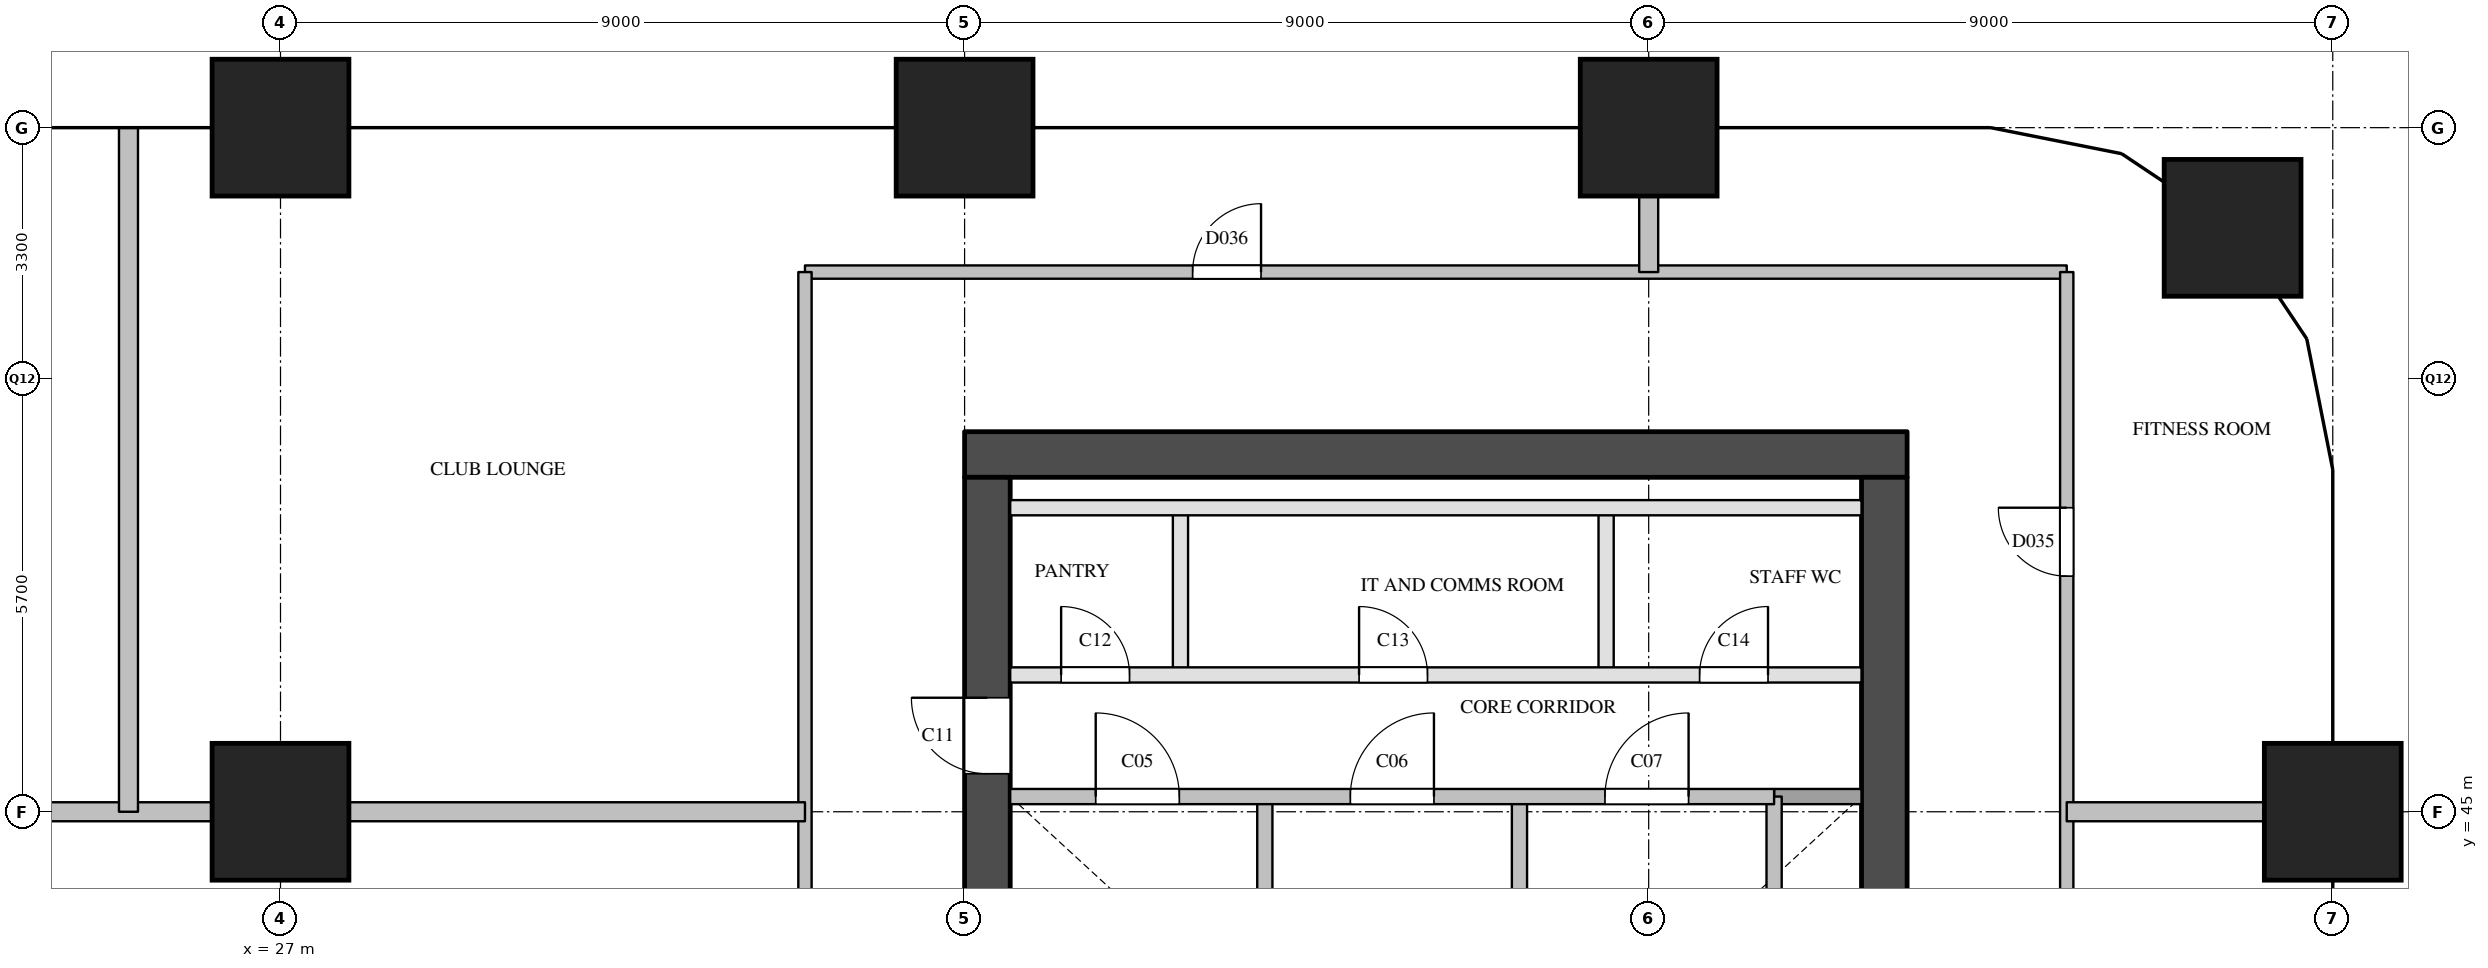
"""IFC4 building model, lengths in metres.
Left out: names, types, materials, properties, quantities, classifications, styles, units other than length and angle.
Written with IfcOpenShell. Run it as: python <this file> out.ifc"""

import sys

from ifc_helpers import new_model, si_unit, direction, frame, frame_2d, origin, origin_2d, place, context, subcontext, project, spatial, rectangle, extrude, element, fill, save


model = new_model("IFC4")
c1 = context("Model", 3, precision=1e-05, world=origin(), true_north=direction((0.0, 1.0)))
c2 = subcontext(c1, "Body", "Model", "MODEL_VIEW")
j1 = project(units=[si_unit("LENGTHUNIT", "METRE"), si_unit("PLANEANGLEUNIT", "RADIAN")], contexts=[c1])
p1 = place(None, origin())
s1 = spatial("IfcSite", under=j1, at=p1, CompositionType="ELEMENT")
p2 = place(p1, origin())
s2 = spatial("IfcBuilding", under=s1, at=p2, CompositionType="ELEMENT")
p3 = place(p2, frame((0.0, 0.0, 85.4)))
s3 = spatial("IfcBuildingStorey", under=s2, at=p3, CompositionType="ELEMENT", Elevation=85.4)
for number, where, z_axis, x_axis in (
    (1, (27.0, 45.0, 0.0), (0.0, 0.0, 1.0), (1.0, 0.0, 0.0)),
    (2, (27.0, 54.0, 0.0), (0.0, 0.0, 1.0), (1.0, 0.0, 0.0)),
    (3, (36.0, 54.0, 0.0), (0.0, 0.0, 1.0), (1.0, 0.0, 0.0)),
    (4, (45.0, 54.0, 0.0), (0.0, 0.0, 1.0), (1.0, 0.0, 0.0)),
    (5, (54.0, 45.0, 0.0), (0.0, 0.0, 1.0), (1.0, 0.0, 0.0)),
    (6, (52.682, 52.682, 0.0), (0.0, 0.0, 1.0), (1.0, 0.0, 0.0)),
):
    element("IfcColumn", number, at=place(p3, frame(where, z_axis=z_axis, x_axis=x_axis)), inside=s3, PredefinedType="COLUMN", context=c2, shape_type="SweptSolid", body=[
        extrude(rectangle(XDim=1.8, YDim=1.8, at=origin_2d()), origin(), (0.0, 0.0, 1.0), 3.8),
    ])
p4 = place(p3, frame((36.0, 49.7, 0.0), z_axis=(0.0, 0.0, 1.0), x_axis=(1.0, 0.0, 0.0)))
e7 = element("IfcWall", 7, at=p4, inside=s3, PredefinedType="SHEAR", context=c2, shape_type="SweptSolid", body=[
    extrude(rectangle(XDim=12.4, YDim=0.6, at=frame_2d((6.2, 0.0))), origin(), (0.0, 0.0, 1.0), 3.5),
])
p5 = place(p3, frame((36.3, 29.1, 0.0), z_axis=(0.0, 0.0, 1.0), x_axis=(0.0, 1.0, 0.0)))
e8 = element("IfcWall", 8, at=p5, inside=s3, PredefinedType="SHEAR", context=c2, shape_type="SweptSolid", body=[
    extrude(rectangle(XDim=20.3, YDim=0.6, at=frame_2d((10.15, 0.0))), origin(), (0.0, 0.0, 1.0), 3.5),
])
p6 = place(p5, frame((3.6, 0.0, 0.0)))
e9 = element("IfcOpeningElement", 9, at=p6, cuts=e8, PredefinedType="OPENING", context=c2, shape_type="SweptSolid", body=[
    extrude(rectangle(XDim=1.8, YDim=2.1, at=frame_2d((0.9, 1.05))), frame((0.0, 0.31, 0.0), z_axis=(0.0, -1.0, 0.0), x_axis=(1.0, 0.0, 0.0)), (0.0, 0.0, 1.0), 0.62),
])
p7 = place(p5, frame((16.4, 0.0, 0.0)))
e10 = element("IfcOpeningElement", 10, at=p7, cuts=e8, PredefinedType="OPENING", context=c2, shape_type="SweptSolid", body=[
    extrude(rectangle(XDim=1.0, YDim=2.1, at=frame_2d((0.5, 1.05))), frame((0.0, 0.31, 0.0), z_axis=(0.0, -1.0, 0.0), x_axis=(1.0, 0.0, 0.0)), (0.0, 0.0, 1.0), 0.62),
])
p8 = place(p3, frame((48.1, 29.1, 0.0), z_axis=(0.0, 0.0, 1.0), x_axis=(0.0, 1.0, 0.0)))
e11 = element("IfcWall", 11, at=p8, inside=s3, PredefinedType="SHEAR", context=c2, shape_type="SweptSolid", body=[
    extrude(rectangle(XDim=20.3, YDim=0.6, at=frame_2d((10.15, 0.0))), origin(), (0.0, 0.0, 1.0), 3.5),
])
p9 = place(p8, frame((12.5, 0.0, 0.0)))
e12 = element("IfcOpeningElement", 12, at=p9, cuts=e11, PredefinedType="OPENING", context=c2, shape_type="SweptSolid", body=[
    extrude(rectangle(XDim=0.7, YDim=2.1, at=frame_2d((0.35, 1.05))), frame((0.0, 0.31, 0.0), z_axis=(0.0, -1.0, 0.0), x_axis=(1.0, 0.0, 0.0)), (0.0, 0.0, 1.0), 0.62),
])
p10 = place(p8, frame((3.9, 0.0, 0.0)))
e13 = element("IfcOpeningElement", 13, at=p10, cuts=e11, PredefinedType="OPENING", context=c2, shape_type="SweptSolid", body=[
    extrude(rectangle(XDim=1.8, YDim=2.1, at=frame_2d((0.9, 1.05))), frame((0.0, 0.31, 0.0), z_axis=(0.0, -1.0, 0.0), x_axis=(1.0, 0.0, 0.0)), (0.0, 0.0, 1.0), 0.62),
])
p11 = place(p3, frame((38.84, 46.8, 0.0), z_axis=(0.0, 0.0, 1.0), x_axis=(0.0, 1.0, 0.0)))
e14 = element("IfcWall", 14, at=p11, inside=s3, PredefinedType="PARTITIONING", context=c2, shape_type="SweptSolid", body=[
    extrude(rectangle(XDim=2.2, YDim=0.2, at=frame_2d((1.1, 0.0))), origin(), (0.0, 0.0, 1.0), 3.5),
])
for number, where, z_axis, x_axis in (
    (15, (39.95, 40.78, 0.0), (0.0, 0.0, 1.0), (0.0, 1.0, 0.0)),
    (16, (43.3, 40.78, 0.0), (0.0, 0.0, 1.0), (0.0, 1.0, 0.0)),
):
    element("IfcWall", number, at=place(p3, frame(where, z_axis=z_axis, x_axis=x_axis)), inside=s3, PredefinedType="SOLIDWALL", context=c2, shape_type="SweptSolid", body=[
        extrude(rectangle(XDim=4.42, YDim=0.2, at=frame_2d((2.21, 0.0))), origin(), (0.0, 0.0, 1.0), 3.5),
    ])
p12 = place(p3, frame((44.44, 46.8, 0.0), z_axis=(0.0, 0.0, 1.0), x_axis=(0.0, 1.0, 0.0)))
e17 = element("IfcWall", 17, at=p12, inside=s3, PredefinedType="PARTITIONING", context=c2, shape_type="SweptSolid", body=[
    extrude(rectangle(XDim=2.2, YDim=0.2, at=frame_2d((1.1, 0.0))), origin(), (0.0, 0.0, 1.0), 3.5),
])
p13 = place(p3, frame((46.65, 40.78, 0.0), z_axis=(0.0, 0.0, 1.0), x_axis=(0.0, 1.0, 0.0)))
e18 = element("IfcWall", 18, at=p13, inside=s3, PredefinedType="SOLIDWALL", context=c2, shape_type="SweptSolid", body=[
    extrude(rectangle(XDim=4.42, YDim=0.2, at=frame_2d((2.21, 0.0))), origin(), (0.0, 0.0, 1.0), 3.5),
])
p14 = place(p3, frame((46.65, 45.2, 0.0), z_axis=(0.0, 0.0, 1.0), x_axis=(1.0, 0.0, 0.0)))
e19 = element("IfcWall", 19, at=p14, inside=s3, PredefinedType="SOLIDWALL", context=c2, shape_type="SweptSolid", body=[
    extrude(rectangle(XDim=1.15, YDim=0.2, at=frame_2d((0.575, 0.0))), origin(), (0.0, 0.0, 1.0), 3.5),
])
p15 = place(p3, frame((36.6, 45.2, 0.0), z_axis=(0.0, 0.0, 1.0), x_axis=(1.0, 0.0, 0.0)))
e20 = element("IfcWall", 20, at=p15, inside=s3, PredefinedType="SOLIDWALL", context=c2, shape_type="SweptSolid", body=[
    extrude(rectangle(XDim=10.05, YDim=0.2, at=frame_2d((5.025, 0.0))), origin(), (0.0, 0.0, 1.0), 3.5),
])
p16 = place(p15, frame((1.125, 0.0, 0.0)))
e21 = element("IfcOpeningElement", 21, at=p16, cuts=e20, PredefinedType="OPENING", context=c2, shape_type="SweptSolid", body=[
    extrude(rectangle(XDim=1.1, YDim=2.1, at=frame_2d((0.55, 1.05))), frame((0.0, 0.11, 0.0), z_axis=(0.0, -1.0, 0.0), x_axis=(1.0, 0.0, 0.0)), (0.0, 0.0, 1.0), 0.22),
])
p17 = place(p15, frame((4.475, 0.0, 0.0)))
e22 = element("IfcOpeningElement", 22, at=p17, cuts=e20, PredefinedType="OPENING", context=c2, shape_type="SweptSolid", body=[
    extrude(rectangle(XDim=1.1, YDim=2.1, at=frame_2d((0.55, 1.05))), frame((0.0, 0.11, 0.0), z_axis=(0.0, -1.0, 0.0), x_axis=(1.0, 0.0, 0.0)), (0.0, 0.0, 1.0), 0.22),
])
p18 = place(p15, frame((7.825, 0.0, 0.0)))
e23 = element("IfcOpeningElement", 23, at=p18, cuts=e20, PredefinedType="OPENING", context=c2, shape_type="SweptSolid", body=[
    extrude(rectangle(XDim=1.1, YDim=2.1, at=frame_2d((0.55, 1.05))), frame((0.0, 0.11, 0.0), z_axis=(0.0, -1.0, 0.0), x_axis=(1.0, 0.0, 0.0)), (0.0, 0.0, 1.0), 0.22),
])
p19 = place(p3, frame((36.6, 46.8, 0.0), z_axis=(0.0, 0.0, 1.0), x_axis=(1.0, 0.0, 0.0)))
e24 = element("IfcWall", 24, at=p19, inside=s3, PredefinedType="PARTITIONING", context=c2, shape_type="SweptSolid", body=[
    extrude(rectangle(XDim=11.2, YDim=0.2, at=frame_2d((5.6, 0.0))), origin(), (0.0, 0.0, 1.0), 3.5),
])
p20 = place(p19, frame((0.67, 0.0, 0.0)))
e25 = element("IfcOpeningElement", 25, at=p20, cuts=e24, PredefinedType="OPENING", context=c2, shape_type="SweptSolid", body=[
    extrude(rectangle(XDim=0.9, YDim=2.1, at=frame_2d((0.45, 1.05))), frame((0.0, 0.11, 0.0), z_axis=(0.0, -1.0, 0.0), x_axis=(1.0, 0.0, 0.0)), (0.0, 0.0, 1.0), 0.22),
])
p21 = place(p19, frame((4.59, 0.0, 0.0)))
e26 = element("IfcOpeningElement", 26, at=p21, cuts=e24, PredefinedType="OPENING", context=c2, shape_type="SweptSolid", body=[
    extrude(rectangle(XDim=0.9, YDim=2.1, at=frame_2d((0.45, 1.05))), frame((0.0, 0.11, 0.0), z_axis=(0.0, -1.0, 0.0), x_axis=(1.0, 0.0, 0.0)), (0.0, 0.0, 1.0), 0.22),
])
p22 = place(p19, frame((9.07, 0.0, 0.0)))
e27 = element("IfcOpeningElement", 27, at=p22, cuts=e24, PredefinedType="OPENING", context=c2, shape_type="SweptSolid", body=[
    extrude(rectangle(XDim=0.9, YDim=2.1, at=frame_2d((0.45, 1.05))), frame((0.0, 0.11, 0.0), z_axis=(0.0, -1.0, 0.0), x_axis=(1.0, 0.0, 0.0)), (0.0, 0.0, 1.0), 0.22),
])
p23 = place(p3, frame((36.6, 49.0, 0.0), z_axis=(0.0, 0.0, 1.0), x_axis=(1.0, 0.0, 0.0)))
e28 = element("IfcWall", 28, at=p23, inside=s3, PredefinedType="PARTITIONING", context=c2, shape_type="SweptSolid", body=[
    extrude(rectangle(XDim=11.2, YDim=0.2, at=frame_2d((5.6, 0.0))), origin(), (0.0, 0.0, 1.0), 3.5),
])
p24 = place(p3, frame((33.9, 52.1, 0.0), z_axis=(0.0, 0.0, 1.0), x_axis=(1.0, 0.0, 0.0)))
e29 = element("IfcWall", 29, at=p24, inside=s3, PredefinedType="PARTITIONING", context=c2, shape_type="SweptSolid", body=[
    extrude(rectangle(XDim=16.6, YDim=0.175, at=frame_2d((8.3, 0.0))), origin(), (0.0, 0.0, 1.0), 3.5),
])
p25 = place(p24, frame((5.1, 0.0, 0.0)))
e30 = element("IfcOpeningElement", 30, at=p25, cuts=e29, PredefinedType="OPENING", context=c2, shape_type="SweptSolid", body=[
    extrude(rectangle(XDim=0.9, YDim=2.1, at=frame_2d((0.45, 1.05))), frame((0.0, 0.097, 0.0), z_axis=(0.0, -1.0, 0.0), x_axis=(1.0, 0.0, 0.0)), (0.0, 0.0, 1.0), 0.195),
])
p26 = place(p3, frame((33.9, 28.52, 0.0), z_axis=(0.0, 0.0, 1.0), x_axis=(0.0, 1.0, 0.0)))
e31 = element("IfcWall", 31, at=p26, inside=s3, PredefinedType="PARTITIONING", context=c2, shape_type="SweptSolid", body=[
    extrude(rectangle(XDim=23.58, YDim=0.175, at=frame_2d((11.79, 0.0))), origin(), (0.0, 0.0, 1.0), 3.5),
])
p27 = place(p26, frame((2.74, 0.0, 0.0)))
e32 = element("IfcOpeningElement", 32, at=p27, cuts=e31, PredefinedType="OPENING", context=c2, shape_type="SweptSolid", body=[
    extrude(rectangle(XDim=1.0, YDim=2.1, at=frame_2d((0.5, 1.05))), frame((0.0, 0.097, 0.0), z_axis=(0.0, -1.0, 0.0), x_axis=(1.0, 0.0, 0.0)), (0.0, 0.0, 1.0), 0.195),
])
p28 = place(p26, frame((8.48, 0.0, 0.0)))
e33 = element("IfcOpeningElement", 33, at=p28, cuts=e31, PredefinedType="OPENING", context=c2, shape_type="SweptSolid", body=[
    extrude(rectangle(XDim=1.0, YDim=2.1, at=frame_2d((0.5, 1.05))), frame((0.0, 0.097, 0.0), z_axis=(0.0, -1.0, 0.0), x_axis=(1.0, 0.0, 0.0)), (0.0, 0.0, 1.0), 0.195),
])
p29 = place(p26, frame((13.48, 0.0, 0.0)))
e34 = element("IfcOpeningElement", 34, at=p29, cuts=e31, PredefinedType="OPENING", context=c2, shape_type="SweptSolid", body=[
    extrude(rectangle(XDim=1.0, YDim=2.1, at=frame_2d((0.5, 1.05))), frame((0.0, 0.097, 0.0), z_axis=(0.0, -1.0, 0.0), x_axis=(1.0, 0.0, 0.0)), (0.0, 0.0, 1.0), 0.195),
])
p30 = place(p3, frame((50.5, 26.4, 0.0), z_axis=(0.0, 0.0, 1.0), x_axis=(0.0, 1.0, 0.0)))
e35 = element("IfcWall", 35, at=p30, inside=s3, PredefinedType="PARTITIONING", context=c2, shape_type="SweptSolid", body=[
    extrude(rectangle(XDim=25.7, YDim=0.175, at=frame_2d((12.85, 0.0))), origin(), (0.0, 0.0, 1.0), 2.5),
])
p31 = place(p30, frame((3.85, 0.0, 0.0)))
e36 = element("IfcOpeningElement", 36, at=p31, cuts=e35, PredefinedType="OPENING", context=c2, shape_type="SweptSolid", body=[
    extrude(rectangle(XDim=0.9, YDim=2.1, at=frame_2d((0.45, 1.05))), frame((0.0, 0.097, 0.0), z_axis=(0.0, -1.0, 0.0), x_axis=(1.0, 0.0, 0.0)), (0.0, 0.0, 1.0), 0.195),
])
p32 = place(p30, frame((13.15, 0.0, 0.0)))
e37 = element("IfcOpeningElement", 37, at=p32, cuts=e35, PredefinedType="OPENING", context=c2, shape_type="SweptSolid", body=[
    extrude(rectangle(XDim=0.9, YDim=2.1, at=frame_2d((0.45, 1.05))), frame((0.0, 0.097, 0.0), z_axis=(0.0, -1.0, 0.0), x_axis=(1.0, 0.0, 0.0)), (0.0, 0.0, 1.0), 0.195),
])
p33 = place(p30, frame((21.7, 0.0, 0.0)))
e38 = element("IfcOpeningElement", 38, at=p33, cuts=e35, PredefinedType="OPENING", context=c2, shape_type="SweptSolid", body=[
    extrude(rectangle(XDim=0.9, YDim=2.1, at=frame_2d((0.45, 1.05))), frame((0.0, 0.097, 0.0), z_axis=(0.0, -1.0, 0.0), x_axis=(1.0, 0.0, 0.0)), (0.0, 0.0, 1.0), 0.195),
])
p34 = place(p3, frame((20.1, 45.0, 0.0), z_axis=(0.0, 0.0, 1.0), x_axis=(1.0, 0.0, 0.0)))
e39 = element("IfcWall", 39, at=p34, inside=s3, PredefinedType="PARTITIONING", context=c2, shape_type="SweptSolid", body=[
    extrude(rectangle(XDim=13.8, YDim=0.25, at=frame_2d((6.9, 0.0))), origin(), (0.0, 0.0, 1.0), 3.5),
])
p35 = place(p3, frame((50.5, 45.0, 0.0), z_axis=(0.0, 0.0, 1.0), x_axis=(1.0, 0.0, 0.0)))
e40 = element("IfcWall", 40, at=p35, inside=s3, PredefinedType="PARTITIONING", context=c2, shape_type="SweptSolid", body=[
    extrude(rectangle(XDim=3.5, YDim=0.25, at=frame_2d((1.75, 0.0))), origin(), (0.0, 0.0, 1.0), 3.5),
])
p36 = place(p3, frame((25.0, 45.0, 0.0), z_axis=(0.0, 0.0, 1.0), x_axis=(0.0, 1.0, 0.0)))
e41 = element("IfcWall", 41, at=p36, inside=s3, PredefinedType="PARTITIONING", context=c2, shape_type="SweptSolid", body=[
    extrude(rectangle(XDim=9.0, YDim=0.25, at=frame_2d((4.5, 0.0))), origin(), (0.0, 0.0, 1.0), 2.5),
])
p37 = place(p3, frame((45.0, 52.1, 0.0), z_axis=(0.0, 0.0, 1.0), x_axis=(0.0, 1.0, 0.0)))
e42 = element("IfcWall", 42, at=p37, inside=s3, PredefinedType="PARTITIONING", context=c2, shape_type="SweptSolid", body=[
    extrude(rectangle(XDim=1.9, YDim=0.25, at=frame_2d((0.95, 0.0))), origin(), (0.0, 0.0, 1.0), 3.5),
])
p38 = place(p16, origin())
e43 = element("IfcDoor", 43, at=p38, inside=s3, OperationType="SINGLE_SWING_LEFT", PredefinedType="DOOR", context=c2, shape_type="SweptSolid", body=[
    extrude(rectangle(XDim=1.1, YDim=2.1, at=frame_2d((0.55, 1.05))), frame((0.0, 0.025, 0.0), z_axis=(0.0, -1.0, 0.0), x_axis=(1.0, 0.0, 0.0)), (0.0, 0.0, 1.0), 0.05),
])
fill(e21, e43)
p39 = place(p17, origin())
e44 = element("IfcDoor", 44, at=p39, inside=s3, OperationType="SINGLE_SWING_RIGHT", PredefinedType="DOOR", context=c2, shape_type="SweptSolid", body=[
    extrude(rectangle(XDim=1.1, YDim=2.1, at=frame_2d((0.55, 1.05))), frame((0.0, 0.025, 0.0), z_axis=(0.0, -1.0, 0.0), x_axis=(1.0, 0.0, 0.0)), (0.0, 0.0, 1.0), 0.05),
])
fill(e22, e44)
p40 = place(p18, origin())
e45 = element("IfcDoor", 45, at=p40, inside=s3, OperationType="SINGLE_SWING_RIGHT", PredefinedType="DOOR", context=c2, shape_type="SweptSolid", body=[
    extrude(rectangle(XDim=1.1, YDim=2.1, at=frame_2d((0.55, 1.05))), frame((0.0, 0.025, 0.0), z_axis=(0.0, -1.0, 0.0), x_axis=(1.0, 0.0, 0.0)), (0.0, 0.0, 1.0), 0.05),
])
fill(e23, e45)
p41 = place(p7, origin())
e46 = element("IfcDoor", 46, at=p41, inside=s3, OperationType="SINGLE_SWING_RIGHT", PredefinedType="DOOR", context=c2, shape_type="SweptSolid", body=[
    extrude(rectangle(XDim=1.0, YDim=2.1, at=frame_2d((0.5, 1.05))), frame((0.0, 0.025, 0.0), z_axis=(0.0, -1.0, 0.0), x_axis=(1.0, 0.0, 0.0)), (0.0, 0.0, 1.0), 0.05),
])
fill(e10, e46)
p42 = place(p20, origin())
e47 = element("IfcDoor", 47, at=p42, inside=s3, OperationType="SINGLE_SWING_LEFT", PredefinedType="DOOR", context=c2, shape_type="SweptSolid", body=[
    extrude(rectangle(XDim=0.9, YDim=2.1, at=frame_2d((0.45, 1.05))), frame((0.0, 0.025, 0.0), z_axis=(0.0, -1.0, 0.0), x_axis=(1.0, 0.0, 0.0)), (0.0, 0.0, 1.0), 0.05),
])
fill(e25, e47)
p43 = place(p21, origin())
e48 = element("IfcDoor", 48, at=p43, inside=s3, OperationType="SINGLE_SWING_LEFT", PredefinedType="DOOR", context=c2, shape_type="SweptSolid", body=[
    extrude(rectangle(XDim=0.9, YDim=2.1, at=frame_2d((0.45, 1.05))), frame((0.0, 0.025, 0.0), z_axis=(0.0, -1.0, 0.0), x_axis=(1.0, 0.0, 0.0)), (0.0, 0.0, 1.0), 0.05),
])
fill(e26, e48)
p44 = place(p22, origin())
e49 = element("IfcDoor", 49, at=p44, inside=s3, OperationType="SINGLE_SWING_RIGHT", PredefinedType="DOOR", context=c2, shape_type="SweptSolid", body=[
    extrude(rectangle(XDim=0.9, YDim=2.1, at=frame_2d((0.45, 1.05))), frame((0.0, 0.025, 0.0), z_axis=(0.0, -1.0, 0.0), x_axis=(1.0, 0.0, 0.0)), (0.0, 0.0, 1.0), 0.05),
])
fill(e27, e49)
p45 = place(p33, origin())
e50 = element("IfcDoor", 50, at=p45, inside=s3, OperationType="SINGLE_SWING_RIGHT", PredefinedType="DOOR", context=c2, shape_type="SweptSolid", body=[
    extrude(rectangle(XDim=0.9, YDim=2.1, at=frame_2d((0.45, 1.05))), frame((0.0, 0.025, 0.0), z_axis=(0.0, -1.0, 0.0), x_axis=(1.0, 0.0, 0.0)), (0.0, 0.0, 1.0), 0.05),
])
fill(e38, e50)
p46 = place(p25, origin())
e51 = element("IfcDoor", 51, at=p46, inside=s3, OperationType="SINGLE_SWING_RIGHT", PredefinedType="DOOR", context=c2, shape_type="SweptSolid", body=[
    extrude(rectangle(XDim=0.9, YDim=2.1, at=frame_2d((0.45, 1.05))), frame((0.0, 0.025, 0.0), z_axis=(0.0, -1.0, 0.0), x_axis=(1.0, 0.0, 0.0)), (0.0, 0.0, 1.0), 0.05),
])
fill(e30, e51)
save(model, sys.argv[1])
